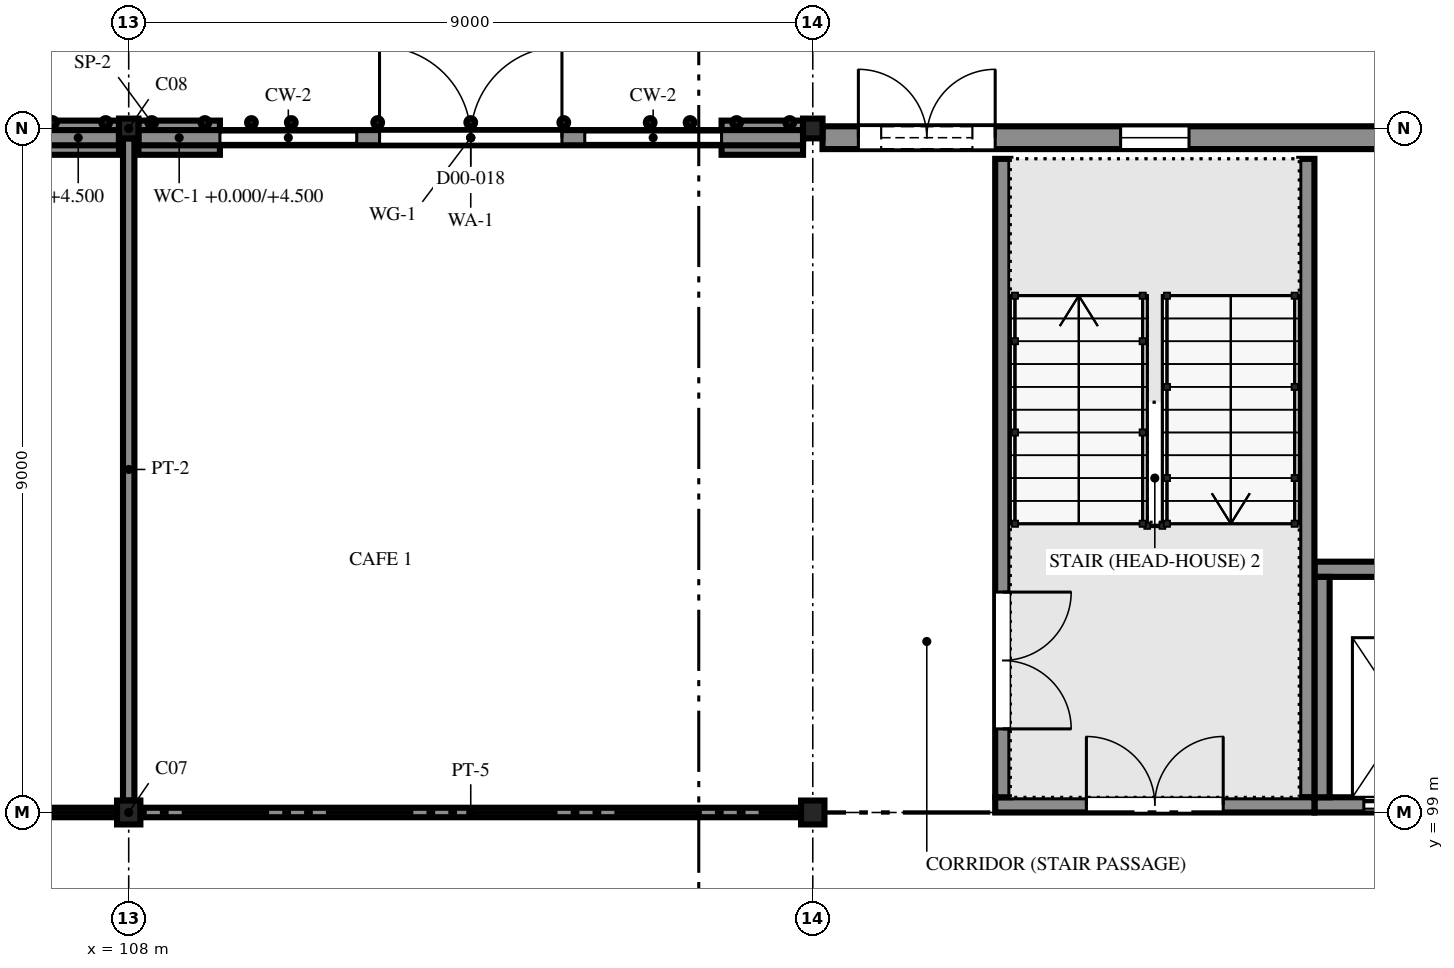
"""IFC4 building model, lengths in metres.
Left out: names, types, materials, properties, quantities, classifications, styles, units other than length and angle.
Written with IfcOpenShell. Run it as: python <this file> out.ifc"""

import sys

from ifc_helpers import new_model, si_unit, direction, frame, frame_2d, origin, origin_2d, place, context, subcontext, project, spatial, polyline, rectangle, i_section, outline, extrude, element, fill, save


model = new_model("IFC4")
c1 = context("Model", 3, precision=1e-05, world=origin(), true_north=direction((0.0, 1.0)))
c2 = subcontext(c1, "Body", "Model", "MODEL_VIEW")
j1 = project(units=[si_unit("LENGTHUNIT", "METRE"), si_unit("PLANEANGLEUNIT", "RADIAN")], contexts=[c1])
p1 = place(None, origin())
s1 = spatial("IfcSite", under=j1, at=p1, CompositionType="ELEMENT")
p2 = place(p1, origin())
s2 = spatial("IfcBuilding", under=s1, at=p2, CompositionType="ELEMENT")
p3 = place(p2, origin())
s3 = spatial("IfcBuildingStorey", under=s2, at=p3, CompositionType="ELEMENT", Elevation=0.0)
p4 = place(p3, frame((108.0, 99.0, -2.1), z_axis=(0.0, 0.0, 1.0), x_axis=(1.0, 0.0, 0.0)))
e1 = element("IfcColumn", 1, at=p4, inside=s3, PredefinedType="COLUMN", context=c2, shape_type="SweptSolid", body=[
    extrude(i_section(OverallWidth=0.307, OverallDepth=0.314, WebThickness=0.012, FlangeThickness=0.019, FilletRadius=0.015, at=origin_2d()), origin(), (0.0, 0.0, 1.0), 9.6),
])
p5 = place(p3, frame((108.0, 108.0, -2.1), z_axis=(0.0, 0.0, 1.0), x_axis=(1.0, 0.0, 0.0)))
e2 = element("IfcColumn", 2, at=p5, inside=s3, PredefinedType="COLUMN", context=c2, shape_type="SweptSolid", body=[
    extrude(i_section(OverallWidth=0.256, OverallDepth=0.26, WebThickness=0.01, FlangeThickness=0.017, FilletRadius=0.013, at=origin_2d()), origin(), (0.0, 0.0, 1.0), 9.6),
])
p6 = place(p3, frame((117.0, 99.0, -2.1), z_axis=(0.0, 0.0, 1.0), x_axis=(1.0, 0.0, 0.0)))
e3 = element("IfcColumn", 3, at=p6, inside=s3, PredefinedType="COLUMN", context=c2, shape_type="SweptSolid", body=[
    extrude(i_section(OverallWidth=0.307, OverallDepth=0.314, WebThickness=0.012, FlangeThickness=0.019, FilletRadius=0.015, at=origin_2d()), origin(), (0.0, 0.0, 1.0), 9.6),
])
p7 = place(p3, frame((117.0, 108.0, -2.1), z_axis=(0.0, 0.0, 1.0), x_axis=(1.0, 0.0, 0.0)))
e4 = element("IfcColumn", 4, at=p7, inside=s3, PredefinedType="COLUMN", context=c2, shape_type="SweptSolid", body=[
    extrude(i_section(OverallWidth=0.256, OverallDepth=0.26, WebThickness=0.01, FlangeThickness=0.017, FilletRadius=0.013, at=origin_2d()), origin(), (0.0, 0.0, 1.0), 9.6),
])
p8 = place(p3, frame((106.8, 107.878, 0.0), z_axis=(0.0, 0.0, 1.0), x_axis=(1.0, 0.0, 0.0)))
e5 = element("IfcWall", 5, at=p8, inside=s3, PredefinedType="SOLIDWALL", context=c2, shape_type="SweptSolid", body=[
    extrude(rectangle(XDim=1.072, YDim=0.45, at=frame_2d((0.536, 0.0))), origin(), (0.0, 0.0, 1.0), 4.5),
])
p9 = place(p3, frame((99.128, 107.878, 4.9), z_axis=(0.0, 0.0, 1.0), x_axis=(1.0, 0.0, 0.0)))
e6 = element("IfcWall", 6, at=p9, inside=s3, PredefinedType="SOLIDWALL", context=c2, shape_type="SweptSolid", body=[
    extrude(rectangle(XDim=8.744, YDim=0.2, at=frame_2d((4.372, 0.0))), origin(), (0.0, 0.0, 1.0), 1.792),
])
p10 = place(p3, frame((108.128, 107.878, 0.0), z_axis=(0.0, 0.0, 1.0), x_axis=(1.0, 0.0, 0.0)))
e7 = element("IfcWall", 7, at=p10, inside=s3, PredefinedType="SOLIDWALL", context=c2, shape_type="SweptSolid", body=[
    extrude(rectangle(XDim=1.072, YDim=0.45, at=frame_2d((0.536, 0.0))), origin(), (0.0, 0.0, 1.0), 4.5),
])
p11 = place(p3, frame((111.0, 107.878, 0.0), z_axis=(0.0, 0.0, 1.0), x_axis=(1.0, 0.0, 0.0)))
e8 = element("IfcWall", 8, at=p11, inside=s3, PredefinedType="ELEMENTEDWALL", context=c2, shape_type="SweptSolid", body=[
    extrude(rectangle(XDim=3.0, YDim=0.15, at=frame_2d((1.5, 0.0))), origin(), (0.0, 0.0, 1.0), 4.5),
])
p12 = place(p11, frame((0.3, 0.0, 0.0)))
e9 = element("IfcOpeningElement", 9, at=p12, cuts=e8, PredefinedType="OPENING", context=c2, shape_type="SweptSolid", body=[
    extrude(rectangle(XDim=2.4, YDim=2.7, at=frame_2d((1.2, 1.35))), frame((0.0, 0.085, 0.0), z_axis=(0.0, -1.0, 0.0), x_axis=(1.0, 0.0, 0.0)), (0.0, 0.0, 1.0), 0.17),
])
p13 = place(p3, frame((115.8, 107.878, 0.0), z_axis=(0.0, 0.0, 1.0), x_axis=(1.0, 0.0, 0.0)))
e10 = element("IfcWall", 10, at=p13, inside=s3, PredefinedType="SOLIDWALL", context=c2, shape_type="SweptSolid", body=[
    extrude(rectangle(XDim=1.072, YDim=0.45, at=frame_2d((0.536, 0.0))), origin(), (0.0, 0.0, 1.0), 4.5),
])
p14 = place(p3, frame((108.128, 107.878, 4.9), z_axis=(0.0, 0.0, 1.0), x_axis=(1.0, 0.0, 0.0)))
e11 = element("IfcWall", 11, at=p14, inside=s3, PredefinedType="SOLIDWALL", context=c2, shape_type="SweptSolid", body=[
    extrude(rectangle(XDim=8.744, YDim=0.2, at=frame_2d((4.372, 0.0))), origin(), (0.0, 0.0, 1.0), 1.792),
])
p15 = place(p3, frame((117.128, 107.878, 0.0), z_axis=(0.0, 0.0, 1.0), x_axis=(1.0, 0.0, 0.0)))
e12 = element("IfcWall", 12, at=p15, inside=s3, PredefinedType="SOLIDWALL", context=c2, shape_type="SweptSolid", body=[
    extrude(rectangle(XDim=8.744, YDim=0.3, at=frame_2d((4.372, 0.0))), origin(), (0.0, 0.0, 1.0), 6.692),
])
p16 = place(p15, frame((0.472, 0.0, 0.0)))
e13 = element("IfcOpeningElement", 13, at=p16, cuts=e12, PredefinedType="OPENING", context=c2, shape_type="SweptSolid", body=[
    extrude(rectangle(XDim=1.8, YDim=2.4, at=frame_2d((0.9, 1.2))), frame((0.0, 0.16, 0.0), z_axis=(0.0, -1.0, 0.0), x_axis=(1.0, 0.0, 0.0)), (0.0, 0.0, 1.0), 0.32),
])
p17 = place(p15, frame((0.772, 0.0, 2.55)))
e14 = element("IfcOpeningElement", 14, at=p17, cuts=e12, PredefinedType="OPENING", context=c2, shape_type="SweptSolid", body=[
    extrude(rectangle(XDim=1.2, YDim=0.6, at=frame_2d((0.6, 0.3))), frame((0.0, 0.16, 0.0), z_axis=(0.0, -1.0, 0.0), x_axis=(1.0, 0.0, 0.0)), (0.0, 0.0, 1.0), 0.32),
])
p18 = place(p15, frame((3.922, 0.0, 1.2)))
e15 = element("IfcOpeningElement", 15, at=p18, cuts=e12, PredefinedType="OPENING", context=c2, shape_type="SweptSolid", body=[
    extrude(rectangle(XDim=0.9, YDim=1.8, at=frame_2d((0.45, 0.9))), frame((0.0, 0.16, 0.0), z_axis=(0.0, -1.0, 0.0), x_axis=(1.0, 0.0, 0.0)), (0.0, 0.0, 1.0), 0.32),
])
p19 = place(p3, frame((119.4, 99.1, 0.0), z_axis=(0.0, 0.0, 1.0), x_axis=(1.0, 0.0, 0.0)))
e16 = element("IfcWall", 16, at=p19, inside=s3, PredefinedType="SOLIDWALL", context=c2, shape_type="SweptSolid", body=[
    extrude(rectangle(XDim=4.2, YDim=0.2, at=frame_2d((2.1, 0.0))), origin(), (0.0, 0.0, 1.0), 6.757),
])
p20 = place(p19, frame((1.2, 0.0, 0.0)))
e17 = element("IfcOpeningElement", 17, at=p20, cuts=e16, PredefinedType="OPENING", context=c2, shape_type="SweptSolid", body=[
    extrude(rectangle(XDim=1.8, YDim=2.1, at=frame_2d((0.9, 1.05))), frame((0.0, 0.11, 0.0), z_axis=(0.0, -1.0, 0.0), x_axis=(1.0, 0.0, 0.0)), (0.0, 0.0, 1.0), 0.22),
])
p21 = place(p3, frame((119.5, 99.2, 0.0), z_axis=(0.0, 0.0, 1.0), x_axis=(0.0, 1.0, 0.0)))
e18 = element("IfcWall", 18, at=p21, inside=s3, PredefinedType="SOLIDWALL", context=c2, shape_type="SweptSolid", body=[
    extrude(rectangle(XDim=8.4, YDim=0.2, at=frame_2d((4.2, 0.0))), origin(), (0.0, 0.0, 1.0), 6.757),
])
p22 = place(p21, frame((0.9, 0.0, 0.0)))
e19 = element("IfcOpeningElement", 19, at=p22, cuts=e18, PredefinedType="OPENING", context=c2, shape_type="SweptSolid", body=[
    extrude(rectangle(XDim=1.8, YDim=2.1, at=frame_2d((0.9, 1.05))), frame((0.0, 0.11, 0.0), z_axis=(0.0, -1.0, 0.0), x_axis=(1.0, 0.0, 0.0)), (0.0, 0.0, 1.0), 0.22),
])
p23 = place(p3, frame((123.5, 99.2, 0.0), z_axis=(0.0, 0.0, 1.0), x_axis=(0.0, 1.0, 0.0)))
e20 = element("IfcWall", 20, at=p23, inside=s3, PredefinedType="SOLIDWALL", context=c2, shape_type="SweptSolid", body=[
    extrude(rectangle(XDim=8.4, YDim=0.2, at=frame_2d((4.2, 0.0))), origin(), (0.0, 0.0, 1.0), 6.757),
])
p24 = place(p3, frame((123.602, 99.1, -1.6), z_axis=(0.0, 0.0, 1.0), x_axis=(1.0, 0.0, 0.0)))
e21 = element("IfcWall", 21, at=p24, inside=s3, PredefinedType="SOLIDWALL", context=c2, shape_type="SweptSolid", body=[
    extrude(rectangle(XDim=2.398, YDim=0.2, at=frame_2d((1.199, 0.0))), origin(), (0.0, 0.0, 1.0), 8.357),
])
p25 = place(p24, frame((0.648, 0.0, 1.6)))
e22 = element("IfcOpeningElement", 22, at=p25, cuts=e21, PredefinedType="OPENING", context=c2, shape_type="SweptSolid", body=[
    extrude(rectangle(XDim=1.1, YDim=2.1, at=frame_2d((0.55, 1.05))), frame((0.0, 0.11, 0.0), z_axis=(0.0, -1.0, 0.0), x_axis=(1.0, 0.0, 0.0)), (0.0, 0.0, 1.0), 0.22),
])
p26 = place(p3, frame((123.602, 102.2, -1.6), z_axis=(0.0, 0.0, 1.0), x_axis=(1.0, 0.0, 0.0)))
e23 = element("IfcWall", 23, at=p26, inside=s3, PredefinedType="SOLIDWALL", context=c2, shape_type="SweptSolid", body=[
    extrude(rectangle(XDim=2.398, YDim=0.2, at=frame_2d((1.199, 0.0))), origin(), (0.0, 0.0, 1.0), 8.357),
])
p27 = place(p3, frame((123.7, 99.2, -1.6), z_axis=(0.0, 0.0, 1.0), x_axis=(0.0, 1.0, 0.0)))
e24 = element("IfcWall", 24, at=p27, inside=s3, PredefinedType="SOLIDWALL", context=c2, shape_type="SweptSolid", body=[
    extrude(rectangle(XDim=2.9, YDim=0.2, at=frame_2d((1.45, 0.0))), origin(), (0.0, 0.0, 1.0), 8.357),
])
for number, where, z_axis, x_axis in (
    (25, (108.154, 99.0, 0.0), (0.0, 0.0, 1.0), (1.0, 0.0, 0.0)),
    (26, (99.154, 99.0, 0.0), (0.0, 0.0, 1.0), (1.0, 0.0, 0.0)),
):
    element("IfcWall", number, at=place(p3, frame(where, z_axis=z_axis, x_axis=x_axis)), inside=s3, PredefinedType="PARTITIONING", context=c2, shape_type="SweptSolid", body=[
        extrude(rectangle(XDim=8.692, YDim=0.125, at=frame_2d((4.346, 0.0))), origin(), (0.0, 0.0, 1.0), 6.757),
    ])
p28 = place(p3, frame((108.0, 107.87, 0.0), z_axis=(0.0, 0.0, 1.0), x_axis=(0.0, -1.0, 0.0)))
e27 = element("IfcWall", 27, at=p28, inside=s3, PredefinedType="PARTITIONING", context=c2, shape_type="SweptSolid", body=[
    extrude(rectangle(XDim=8.713, YDim=0.15, at=frame_2d((4.356, 0.0))), origin(), (0.0, 0.0, 1.0), 6.6),
])
p29 = place(p12, origin())
e28 = element("IfcDoor", 28, at=p29, inside=s3, OperationType="DOUBLE_DOOR_SINGLE_SWING", PredefinedType="DOOR", context=c2, shape_type="SweptSolid", body=[
    extrude(outline(polyline([(0.0, 0.0), (0.07, 0.0), (0.07, 2.63), (2.33, 2.63), (2.33, 0.0), (2.4, 0.0), (2.4, 2.7), (0.0, 2.7), (0.0, 0.0)])), frame((0.0, 0.025, 0.0), z_axis=(0.0, -1.0, 0.0), x_axis=(1.0, 0.0, 0.0)), (0.0, 0.0, 1.0), 0.05),
    extrude(outline(polyline([(0.074, 0.01), (1.197, 0.01), (1.197, 2.626), (0.074, 2.626), (0.074, 0.01)]), holes=[polyline([(0.164, 0.31), (1.107, 0.31), (1.107, 2.536), (0.164, 2.536), (0.164, 0.31)])]), frame((0.0, 0.017, 0.0), z_axis=(0.0, -1.0, 0.0), x_axis=(1.0, 0.0, 0.0)), (0.0, 0.0, 1.0), 0.035),
    extrude(rectangle(XDim=0.943, YDim=2.226, at=frame_2d((0.635, 1.423))), frame((0.0, 0.006, 0.0), z_axis=(0.0, -1.0, 0.0), x_axis=(1.0, 0.0, 0.0)), (0.0, 0.0, 1.0), 0.012),
    extrude(outline(polyline([(1.203, 0.01), (2.326, 0.01), (2.326, 2.626), (1.203, 2.626), (1.203, 0.01)]), holes=[polyline([(1.293, 0.31), (2.236, 0.31), (2.236, 2.536), (1.293, 2.536), (1.293, 0.31)])]), frame((0.0, 0.017, 0.0), z_axis=(0.0, -1.0, 0.0), x_axis=(1.0, 0.0, 0.0)), (0.0, 0.0, 1.0), 0.035),
    extrude(rectangle(XDim=0.943, YDim=2.226, at=frame_2d((1.764, 1.423))), frame((0.0, 0.006, 0.0), z_axis=(0.0, -1.0, 0.0), x_axis=(1.0, 0.0, 0.0)), (0.0, 0.0, 1.0), 0.012),
])
fill(e9, e28)
p30 = place(p16, origin())
e29 = element("IfcDoor", 29, at=p30, inside=s3, OperationType="DOUBLE_DOOR_SINGLE_SWING", PredefinedType="DOOR", context=c2, shape_type="SweptSolid", body=[
    extrude(outline(polyline([(0.0, 0.0), (0.07, 0.0), (0.07, 2.33), (1.73, 2.33), (1.73, 0.0), (1.8, 0.0), (1.8, 2.4), (0.0, 2.4), (0.0, 0.0)])), frame((0.0, 0.025, 0.0), z_axis=(0.0, -1.0, 0.0), x_axis=(1.0, 0.0, 0.0)), (0.0, 0.0, 1.0), 0.05),
    extrude(outline(polyline([(0.074, 0.01), (0.897, 0.01), (0.897, 2.326), (0.074, 2.326), (0.074, 0.01)]), holes=[polyline([(0.194, 0.16), (0.777, 0.16), (0.777, 1.01), (0.194, 1.01), (0.194, 0.16)]), polyline([(0.335, 1.16), (0.635, 1.16), (0.635, 1.76), (0.335, 1.76), (0.335, 1.16)])]), frame((0.0, 0.017, 0.0), z_axis=(0.0, -1.0, 0.0), x_axis=(1.0, 0.0, 0.0)), (0.0, 0.0, 1.0), 0.035),
    extrude(rectangle(XDim=0.583, YDim=0.85, at=frame_2d((0.485, 0.585))), frame((0.0, 0.009, 0.0), z_axis=(0.0, -1.0, 0.0), x_axis=(1.0, 0.0, 0.0)), (0.0, 0.0, 1.0), 0.017),
    extrude(rectangle(XDim=0.3, YDim=0.6, at=frame_2d((0.485, 1.46))), frame((0.0, 0.006, 0.0), z_axis=(0.0, -1.0, 0.0), x_axis=(1.0, 0.0, 0.0)), (0.0, 0.0, 1.0), 0.012),
    extrude(outline(polyline([(0.903, 0.01), (1.726, 0.01), (1.726, 2.326), (0.903, 2.326), (0.903, 0.01)]), holes=[polyline([(1.023, 0.16), (1.606, 0.16), (1.606, 1.01), (1.023, 1.01), (1.023, 0.16)]), polyline([(1.165, 1.16), (1.465, 1.16), (1.465, 1.76), (1.165, 1.76), (1.165, 1.16)])]), frame((0.0, 0.017, 0.0), z_axis=(0.0, -1.0, 0.0), x_axis=(1.0, 0.0, 0.0)), (0.0, 0.0, 1.0), 0.035),
    extrude(rectangle(XDim=0.583, YDim=0.85, at=frame_2d((1.314, 0.585))), frame((0.0, 0.009, 0.0), z_axis=(0.0, -1.0, 0.0), x_axis=(1.0, 0.0, 0.0)), (0.0, 0.0, 1.0), 0.017),
    extrude(rectangle(XDim=0.3, YDim=0.6, at=frame_2d((1.314, 1.46))), frame((0.0, 0.006, 0.0), z_axis=(0.0, -1.0, 0.0), x_axis=(1.0, 0.0, 0.0)), (0.0, 0.0, 1.0), 0.012),
])
fill(e13, e29)
p31 = place(p17, origin())
e30 = element("IfcWindow", 30, at=p31, inside=s3, PartitioningType="SINGLE_PANEL", PredefinedType="WINDOW", context=c2, shape_type="SweptSolid", body=[
    extrude(outline(polyline([(0.0, 0.0), (1.2, 0.0), (1.2, 0.6), (0.0, 0.6), (0.0, 0.0)]), holes=[polyline([(0.07, 0.07), (1.13, 0.07), (1.13, 0.53), (0.07, 0.53), (0.07, 0.07)])]), frame((0.0, 0.03, 0.0), z_axis=(0.0, -1.0, 0.0), x_axis=(1.0, 0.0, 0.0)), (0.0, 0.0, 1.0), 0.06),
    extrude(outline(polyline([(0.07, 0.07), (1.13, 0.07), (1.13, 0.53), (0.07, 0.53), (0.07, 0.07)]), holes=[polyline([(0.1, 0.1), (1.1, 0.1), (1.1, 0.5), (0.1, 0.5), (0.1, 0.1)])]), frame((0.0, 0.022, 0.0), z_axis=(0.0, -1.0, 0.0), x_axis=(1.0, 0.0, 0.0)), (0.0, 0.0, 1.0), 0.045),
    extrude(rectangle(XDim=1.0, YDim=0.4, at=frame_2d((0.6, 0.3))), frame((0.0, 0.006, 0.0), z_axis=(0.0, -1.0, 0.0), x_axis=(1.0, 0.0, 0.0)), (0.0, 0.0, 1.0), 0.012),
])
fill(e14, e30)
p32 = place(p18, origin())
e31 = element("IfcWindow", 31, at=p32, inside=s3, PartitioningType="SINGLE_PANEL", PredefinedType="WINDOW", context=c2, shape_type="SweptSolid", body=[
    extrude(outline(polyline([(0.0, 0.0), (0.9, 0.0), (0.9, 1.8), (0.0, 1.8), (0.0, 0.0)]), holes=[polyline([(0.07, 0.07), (0.83, 0.07), (0.83, 1.73), (0.07, 1.73), (0.07, 0.07)])]), frame((0.0, 0.03, 0.0), z_axis=(0.0, -1.0, 0.0), x_axis=(1.0, 0.0, 0.0)), (0.0, 0.0, 1.0), 0.06),
    extrude(outline(polyline([(0.07, 0.07), (0.83, 0.07), (0.83, 1.73), (0.07, 1.73), (0.07, 0.07)]), holes=[polyline([(0.1, 0.1), (0.8, 0.1), (0.8, 1.7), (0.1, 1.7), (0.1, 0.1)])]), frame((0.0, 0.022, 0.0), z_axis=(0.0, -1.0, 0.0), x_axis=(1.0, 0.0, 0.0)), (0.0, 0.0, 1.0), 0.045),
    extrude(rectangle(XDim=0.7, YDim=1.6, at=frame_2d((0.45, 0.9))), frame((0.0, 0.006, 0.0), z_axis=(0.0, -1.0, 0.0), x_axis=(1.0, 0.0, 0.0)), (0.0, 0.0, 1.0), 0.012),
])
fill(e15, e31)
p33 = place(p25, origin())
e32 = element("IfcDoor", 32, at=p33, inside=s3, OperationType="SLIDING_TO_LEFT", PredefinedType="DOOR", context=c2, shape_type="SweptSolid", body=[
    extrude(outline(polyline([(0.0, 0.0), (0.07, 0.0), (0.07, 2.03), (1.03, 2.03), (1.03, 0.0), (1.1, 0.0), (1.1, 2.1), (0.0, 2.1), (0.0, 0.0)])), frame((0.0, 0.025, 0.0), z_axis=(0.0, -1.0, 0.0), x_axis=(1.0, 0.0, 0.0)), (0.0, 0.0, 1.0), 0.05),
    extrude(rectangle(XDim=0.524, YDim=2.016, at=frame_2d((0.336, 1.018))), frame((0.0, 0.018, 0.0), z_axis=(0.0, -1.0, 0.0), x_axis=(1.0, 0.0, 0.0)), (0.0, 0.0, 1.0), 0.016),
    extrude(rectangle(XDim=0.52, YDim=2.016, at=frame_2d((0.766, 1.018))), frame((0.0, -0.002, 0.0), z_axis=(0.0, -1.0, 0.0), x_axis=(1.0, 0.0, 0.0)), (0.0, 0.0, 1.0), 0.016),
])
fill(e22, e32)
p34 = place(p22, frame((1.8, 0.0, 0.0), z_axis=(0.0, 0.0, 1.0), x_axis=(-1.0, 0.0, 0.0)))
e33 = element("IfcDoor", 33, at=p34, inside=s3, OperationType="DOUBLE_DOOR_SINGLE_SWING", PredefinedType="DOOR", context=c2, shape_type="SweptSolid", body=[
    extrude(outline(polyline([(0.0, 0.0), (0.07, 0.0), (0.07, 2.03), (1.73, 2.03), (1.73, 0.0), (1.8, 0.0), (1.8, 2.1), (0.0, 2.1), (0.0, 0.0)])), frame((0.0, 0.025, 0.0), z_axis=(0.0, -1.0, 0.0), x_axis=(1.0, 0.0, 0.0)), (0.0, 0.0, 1.0), 0.05),
    extrude(outline(polyline([(0.074, 0.01), (0.897, 0.01), (0.897, 2.026), (0.074, 2.026), (0.074, 0.01)]), holes=[polyline([(0.194, 0.16), (0.777, 0.16), (0.777, 1.01), (0.194, 1.01), (0.194, 0.16)]), polyline([(0.335, 1.16), (0.635, 1.16), (0.635, 1.76), (0.335, 1.76), (0.335, 1.16)])]), frame((0.0, 0.017, 0.0), z_axis=(0.0, -1.0, 0.0), x_axis=(1.0, 0.0, 0.0)), (0.0, 0.0, 1.0), 0.035),
    extrude(rectangle(XDim=0.583, YDim=0.85, at=frame_2d((0.485, 0.585))), frame((0.0, 0.009, 0.0), z_axis=(0.0, -1.0, 0.0), x_axis=(1.0, 0.0, 0.0)), (0.0, 0.0, 1.0), 0.017),
    extrude(rectangle(XDim=0.3, YDim=0.6, at=frame_2d((0.485, 1.46))), frame((0.0, 0.006, 0.0), z_axis=(0.0, -1.0, 0.0), x_axis=(1.0, 0.0, 0.0)), (0.0, 0.0, 1.0), 0.012),
    extrude(outline(polyline([(0.903, 0.01), (1.726, 0.01), (1.726, 2.026), (0.903, 2.026), (0.903, 0.01)]), holes=[polyline([(1.023, 0.16), (1.606, 0.16), (1.606, 1.01), (1.023, 1.01), (1.023, 0.16)]), polyline([(1.165, 1.16), (1.465, 1.16), (1.465, 1.76), (1.165, 1.76), (1.165, 1.16)])]), frame((0.0, 0.017, 0.0), z_axis=(0.0, -1.0, 0.0), x_axis=(1.0, 0.0, 0.0)), (0.0, 0.0, 1.0), 0.035),
    extrude(rectangle(XDim=0.583, YDim=0.85, at=frame_2d((1.314, 0.585))), frame((0.0, 0.009, 0.0), z_axis=(0.0, -1.0, 0.0), x_axis=(1.0, 0.0, 0.0)), (0.0, 0.0, 1.0), 0.017),
    extrude(rectangle(XDim=0.3, YDim=0.6, at=frame_2d((1.314, 1.46))), frame((0.0, 0.006, 0.0), z_axis=(0.0, -1.0, 0.0), x_axis=(1.0, 0.0, 0.0)), (0.0, 0.0, 1.0), 0.012),
])
fill(e19, e33)
p35 = place(p20, origin())
e34 = element("IfcDoor", 34, at=p35, inside=s3, OperationType="DOUBLE_DOOR_SINGLE_SWING", PredefinedType="DOOR", context=c2, shape_type="SweptSolid", body=[
    extrude(outline(polyline([(0.0, 0.0), (0.07, 0.0), (0.07, 2.03), (1.73, 2.03), (1.73, 0.0), (1.8, 0.0), (1.8, 2.1), (0.0, 2.1), (0.0, 0.0)])), frame((0.0, 0.025, 0.0), z_axis=(0.0, -1.0, 0.0), x_axis=(1.0, 0.0, 0.0)), (0.0, 0.0, 1.0), 0.05),
    extrude(outline(polyline([(0.074, 0.01), (0.897, 0.01), (0.897, 2.026), (0.074, 2.026), (0.074, 0.01)]), holes=[polyline([(0.194, 0.16), (0.777, 0.16), (0.777, 1.01), (0.194, 1.01), (0.194, 0.16)]), polyline([(0.335, 1.16), (0.635, 1.16), (0.635, 1.76), (0.335, 1.76), (0.335, 1.16)])]), frame((0.0, 0.017, 0.0), z_axis=(0.0, -1.0, 0.0), x_axis=(1.0, 0.0, 0.0)), (0.0, 0.0, 1.0), 0.035),
    extrude(rectangle(XDim=0.583, YDim=0.85, at=frame_2d((0.485, 0.585))), frame((0.0, 0.009, 0.0), z_axis=(0.0, -1.0, 0.0), x_axis=(1.0, 0.0, 0.0)), (0.0, 0.0, 1.0), 0.017),
    extrude(rectangle(XDim=0.3, YDim=0.6, at=frame_2d((0.485, 1.46))), frame((0.0, 0.006, 0.0), z_axis=(0.0, -1.0, 0.0), x_axis=(1.0, 0.0, 0.0)), (0.0, 0.0, 1.0), 0.012),
    extrude(outline(polyline([(0.903, 0.01), (1.726, 0.01), (1.726, 2.026), (0.903, 2.026), (0.903, 0.01)]), holes=[polyline([(1.023, 0.16), (1.606, 0.16), (1.606, 1.01), (1.023, 1.01), (1.023, 0.16)]), polyline([(1.165, 1.16), (1.465, 1.16), (1.465, 1.76), (1.165, 1.76), (1.165, 1.16)])]), frame((0.0, 0.017, 0.0), z_axis=(0.0, -1.0, 0.0), x_axis=(1.0, 0.0, 0.0)), (0.0, 0.0, 1.0), 0.035),
    extrude(rectangle(XDim=0.583, YDim=0.85, at=frame_2d((1.314, 0.585))), frame((0.0, 0.009, 0.0), z_axis=(0.0, -1.0, 0.0), x_axis=(1.0, 0.0, 0.0)), (0.0, 0.0, 1.0), 0.017),
    extrude(rectangle(XDim=0.3, YDim=0.6, at=frame_2d((1.314, 1.46))), frame((0.0, 0.006, 0.0), z_axis=(0.0, -1.0, 0.0), x_axis=(1.0, 0.0, 0.0)), (0.0, 0.0, 1.0), 0.012),
])
fill(e17, e34)
save(model, sys.argv[1])
